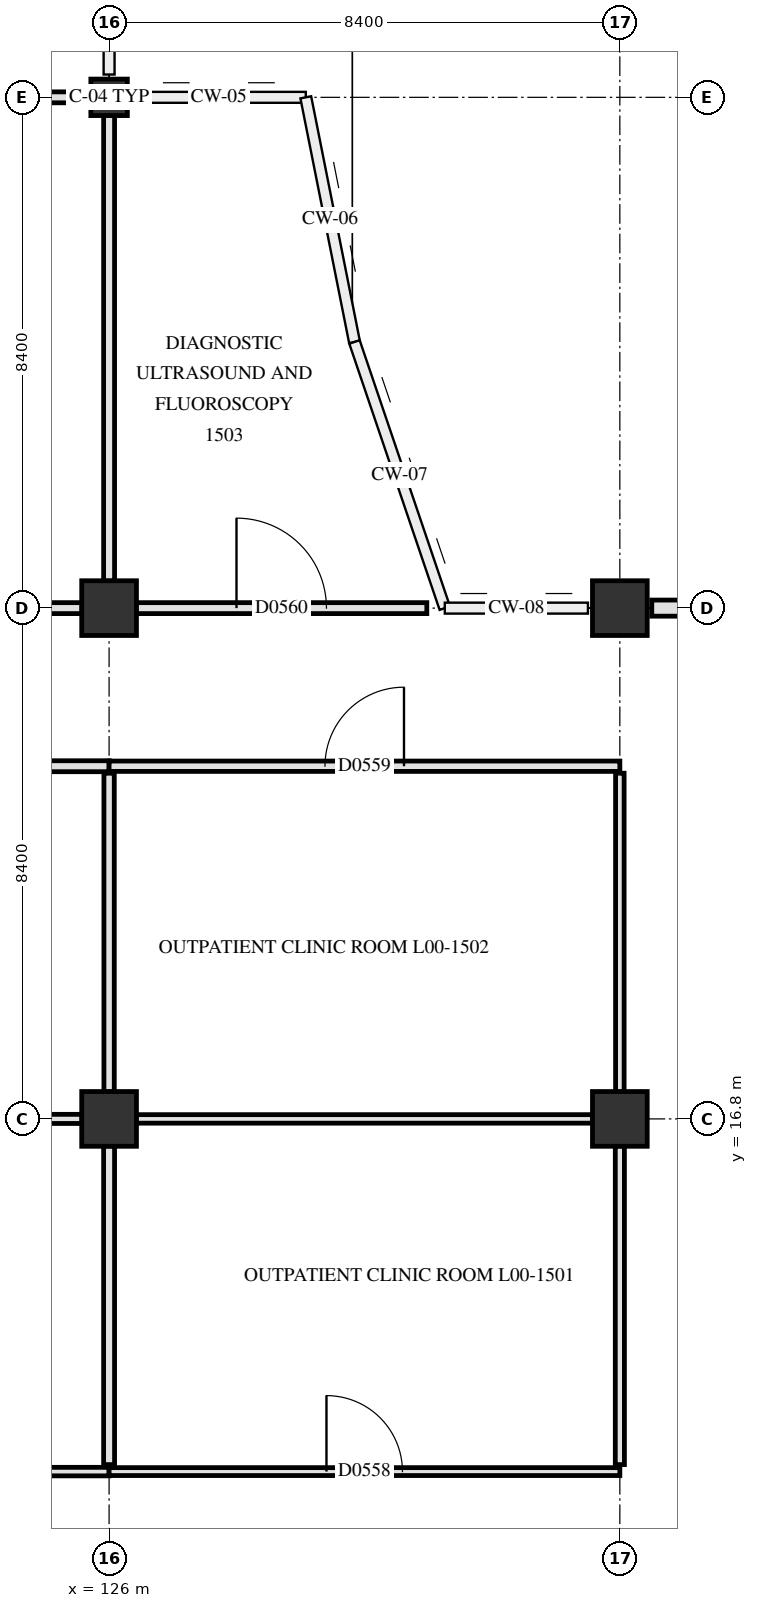
"""IFC4 building model, lengths in metres.
Left out: names, types, materials, properties, quantities, classifications, styles, units other than length and angle.
Written with IfcOpenShell. Run it as: python <this file> out.ifc"""

import sys

from ifc_helpers import new_model, si_unit, direction, frame, frame_2d, origin, origin_2d, place, context, subcontext, project, spatial, rectangle, extrude, element, fill, save


model = new_model("IFC4")
c1 = context("Model", 3, precision=1e-05, world=origin(), true_north=direction((0.0, 1.0)))
c2 = subcontext(c1, "Body", "Model", "MODEL_VIEW")
j1 = project(units=[si_unit("LENGTHUNIT", "METRE"), si_unit("PLANEANGLEUNIT", "RADIAN")], contexts=[c1])
p1 = place(None, origin())
s1 = spatial("IfcSite", under=j1, at=p1, CompositionType="ELEMENT")
p2 = place(p1, origin())
s2 = spatial("IfcBuilding", under=s1, at=p2, CompositionType="ELEMENT")
p3 = place(p2, origin())
s3 = spatial("IfcBuildingStorey", under=s2, at=p3, CompositionType="ELEMENT", Elevation=0.0)
for number, where, z_axis, x_axis in (
    (1, (126.0, 16.8, 0.0), (0.0, 0.0, 1.0), (1.0, 0.0, 0.0)),
    (2, (126.0, 25.2, 0.0), (0.0, 0.0, 1.0), (1.0, 0.0, 0.0)),
):
    element("IfcColumn", number, at=place(p3, frame(where, z_axis=z_axis, x_axis=x_axis)), inside=s3, PredefinedType="COLUMN", context=c2, shape_type="SweptSolid", body=[
        extrude(rectangle(XDim=0.9, YDim=0.9, at=origin_2d()), origin(), (0.0, 0.0, 1.0), 4.8),
    ])
p4 = place(p3, frame((126.0, 33.6, 0.0), z_axis=(0.0, 0.0, 1.0), x_axis=(1.0, 0.0, 0.0)))
e3 = element("IfcColumn", 3, at=p4, inside=s3, PredefinedType="COLUMN", context=c2, shape_type="SweptSolid", body=[
    extrude(rectangle(XDim=0.6, YDim=0.6, at=origin_2d()), origin(), (0.0, 0.0, 1.0), 4.8),
])
for number, where, z_axis, x_axis in (
    (4, (134.4, 16.8, 0.0), (0.0, 0.0, 1.0), (1.0, 0.0, 0.0)),
    (5, (134.4, 25.2, 0.0), (0.0, 0.0, 1.0), (1.0, 0.0, 0.0)),
):
    element("IfcColumn", number, at=place(p3, frame(where, z_axis=z_axis, x_axis=x_axis)), inside=s3, PredefinedType="COLUMN", context=c2, shape_type="SweptSolid", body=[
        extrude(rectangle(XDim=0.9, YDim=0.9, at=origin_2d()), origin(), (0.0, 0.0, 1.0), 4.8),
    ])
p5 = place(p3, frame((134.925, 25.2, 0.0), z_axis=(0.0, 0.0, 1.0), x_axis=(1.0, 0.0, 0.0)))
e6 = element("IfcWall", 6, at=p5, inside=s3, PredefinedType="SOLIDWALL", context=c2, shape_type="SweptSolid", body=[
    extrude(rectangle(XDim=5.572, YDim=0.265, at=frame_2d((2.786, 0.0))), origin(), (0.0, 0.0, 1.0), 3.79),
])
p6 = place(p5, frame((2.086, 0.0, 0.85)))
e7 = element("IfcOpeningElement", 7, at=p6, cuts=e6, PredefinedType="OPENING", context=c2, shape_type="SweptSolid", body=[
    extrude(rectangle(XDim=1.4, YDim=1.42, at=frame_2d((0.7, 0.71))), frame((0.0, 0.142, 0.0), z_axis=(0.0, -1.0, 0.0), x_axis=(1.0, 0.0, 0.0)), (0.0, 0.0, 1.0), 0.285),
])
p7 = place(p3, frame((117.6, 11.0, 0.0), z_axis=(0.0, 0.0, 1.0), x_axis=(1.0, 0.0, 0.0)))
e8 = element("IfcWall", 8, at=p7, inside=s3, PredefinedType="PARTITIONING", context=c2, shape_type="SweptSolid", body=[
    extrude(rectangle(XDim=8.4, YDim=0.14, at=frame_2d((4.2, 0.0))), origin(), (0.0, 0.0, 1.0), 3.89),
])
p8 = place(p7, frame((3.5, 0.0, 0.0)))
e9 = element("IfcOpeningElement", 9, at=p8, cuts=e8, PredefinedType="OPENING", context=c2, shape_type="SweptSolid", body=[
    extrude(rectangle(XDim=1.4, YDim=2.2, at=frame_2d((0.7, 1.1))), frame((0.0, 0.08, 0.0), z_axis=(0.0, -1.0, 0.0), x_axis=(1.0, 0.0, 0.0)), (0.0, 0.0, 1.0), 0.16),
])
p9 = place(p3, frame((126.0, 11.0, 0.0), z_axis=(0.0, 0.0, 1.0), x_axis=(1.0, 0.0, 0.0)))
e10 = element("IfcWall", 10, at=p9, inside=s3, PredefinedType="PARTITIONING", context=c2, shape_type="SweptSolid", body=[
    extrude(rectangle(XDim=8.4, YDim=0.13, at=frame_2d((4.2, 0.0))), origin(), (0.0, 0.0, 1.0), 3.89),
])
p10 = place(p9, frame((3.575, 0.0, 0.0)))
e11 = element("IfcOpeningElement", 11, at=p10, cuts=e10, PredefinedType="OPENING", context=c2, shape_type="SweptSolid", body=[
    extrude(rectangle(XDim=1.25, YDim=2.2, at=frame_2d((0.625, 1.1))), frame((0.0, 0.075, 0.0), z_axis=(0.0, -1.0, 0.0), x_axis=(1.0, 0.0, 0.0)), (0.0, 0.0, 1.0), 0.15),
])
p11 = place(p3, frame((118.045, 16.8, 0.0), z_axis=(0.0, 0.0, 1.0), x_axis=(1.0, 0.0, 0.0)))
e12 = element("IfcWall", 12, at=p11, inside=s3, PredefinedType="PARTITIONING", context=c2, shape_type="SweptSolid", body=[
    extrude(rectangle(XDim=7.51, YDim=0.15, at=frame_2d((3.755, 0.0))), origin(), (0.0, 0.0, 1.0), 3.84),
])
p12 = place(p3, frame((126.445, 16.8, 0.0), z_axis=(0.0, 0.0, 1.0), x_axis=(1.0, 0.0, 0.0)))
e13 = element("IfcWall", 13, at=p12, inside=s3, PredefinedType="PARTITIONING", context=c2, shape_type="SweptSolid", body=[
    extrude(rectangle(XDim=7.51, YDim=0.14, at=frame_2d((3.755, 0.0))), origin(), (0.0, 0.0, 1.0), 3.84),
])
p13 = place(p3, frame((117.6, 22.6, 0.0), z_axis=(0.0, 0.0, 1.0), x_axis=(1.0, 0.0, 0.0)))
e14 = element("IfcWall", 14, at=p13, inside=s3, PredefinedType="PARTITIONING", context=c2, shape_type="SweptSolid", body=[
    extrude(rectangle(XDim=8.4, YDim=0.18, at=frame_2d((4.2, 0.0))), origin(), (0.0, 0.0, 1.0), 3.89),
])
p14 = place(p13, frame((3.525, 0.0, 0.0)))
e15 = element("IfcOpeningElement", 15, at=p14, cuts=e14, PredefinedType="OPENING", context=c2, shape_type="SweptSolid", body=[
    extrude(rectangle(XDim=1.35, YDim=2.2, at=frame_2d((0.675, 1.1))), frame((0.0, 0.1, 0.0), z_axis=(0.0, -1.0, 0.0), x_axis=(1.0, 0.0, 0.0)), (0.0, 0.0, 1.0), 0.2),
])
p15 = place(p3, frame((126.0, 22.6, 0.0), z_axis=(0.0, 0.0, 1.0), x_axis=(1.0, 0.0, 0.0)))
e16 = element("IfcWall", 16, at=p15, inside=s3, PredefinedType="PARTITIONING", context=c2, shape_type="SweptSolid", body=[
    extrude(rectangle(XDim=8.4, YDim=0.17, at=frame_2d((4.2, 0.0))), origin(), (0.0, 0.0, 1.0), 3.89),
])
p16 = place(p15, frame((3.55, 0.0, 0.0)))
e17 = element("IfcOpeningElement", 17, at=p16, cuts=e16, PredefinedType="OPENING", context=c2, shape_type="SweptSolid", body=[
    extrude(rectangle(XDim=1.3, YDim=2.2, at=frame_2d((0.65, 1.1))), frame((0.0, 0.095, 0.0), z_axis=(0.0, -1.0, 0.0), x_axis=(1.0, 0.0, 0.0)), (0.0, 0.0, 1.0), 0.19),
])
p17 = place(p3, frame((118.045, 25.2, 0.0), z_axis=(0.0, 0.0, 1.0), x_axis=(1.0, 0.0, 0.0)))
e18 = element("IfcWall", 18, at=p17, inside=s3, PredefinedType="PARTITIONING", context=c2, shape_type="SweptSolid", body=[
    extrude(rectangle(XDim=7.51, YDim=0.18, at=frame_2d((3.755, 0.0))), origin(), (0.0, 0.0, 1.0), 3.84),
])
p18 = place(p17, frame((3.03, 0.0, 0.0)))
e19 = element("IfcOpeningElement", 19, at=p18, cuts=e18, PredefinedType="OPENING", context=c2, shape_type="SweptSolid", body=[
    extrude(rectangle(XDim=1.45, YDim=2.2, at=frame_2d((0.725, 1.1))), frame((0.0, 0.1, 0.0), z_axis=(0.0, -1.0, 0.0), x_axis=(1.0, 0.0, 0.0)), (0.0, 0.0, 1.0), 0.2),
])
p19 = place(p3, frame((126.445, 25.2, 0.0), z_axis=(0.0, 0.0, 1.0), x_axis=(1.0, 0.0, 0.0)))
e20 = element("IfcWall", 20, at=p19, inside=s3, PredefinedType="PARTITIONING", context=c2, shape_type="SweptSolid", body=[
    extrude(rectangle(XDim=4.78, YDim=0.18, at=frame_2d((2.39, 0.0))), origin(), (0.0, 0.0, 1.0), 3.84),
])
p20 = place(p19, frame((1.65, 0.0, 0.0)))
e21 = element("IfcOpeningElement", 21, at=p20, cuts=e20, PredefinedType="OPENING", context=c2, shape_type="SweptSolid", body=[
    extrude(rectangle(XDim=1.48, YDim=2.22, at=frame_2d((0.74, 1.11))), frame((0.0, 0.1, 0.0), z_axis=(0.0, -1.0, 0.0), x_axis=(1.0, 0.0, 0.0)), (0.0, 0.0, 1.0), 0.2),
])
p21 = place(p3, frame((118.045, 33.6, 0.0), z_axis=(0.0, 0.0, 1.0), x_axis=(1.0, 0.0, 0.0)))
e22 = element("IfcWall", 22, at=p21, inside=s3, PredefinedType="PARTITIONING", context=c2, shape_type="SweptSolid", body=[
    extrude(rectangle(XDim=7.66, YDim=0.18, at=frame_2d((3.83, 0.0))), origin(), (0.0, 0.0, 1.0), 3.84),
])
p22 = place(p3, frame((126.0, 11.115, 0.0), z_axis=(0.0, 0.0, 1.0), x_axis=(0.0, 1.0, 0.0)))
e23 = element("IfcWall", 23, at=p22, inside=s3, PredefinedType="PARTITIONING", context=c2, shape_type="SweptSolid", body=[
    extrude(rectangle(XDim=5.24, YDim=0.18, at=frame_2d((2.62, 0.0))), origin(), (0.0, 0.0, 1.0), 3.89),
])
p23 = place(p3, frame((126.0, 17.245, 0.0), z_axis=(0.0, 0.0, 1.0), x_axis=(0.0, 1.0, 0.0)))
e24 = element("IfcWall", 24, at=p23, inside=s3, PredefinedType="PARTITIONING", context=c2, shape_type="SweptSolid", body=[
    extrude(rectangle(XDim=5.24, YDim=0.17, at=frame_2d((2.62, 0.0))), origin(), (0.0, 0.0, 1.0), 3.89),
])
p24 = place(p3, frame((126.0, 25.645, 0.0), z_axis=(0.0, 0.0, 1.0), x_axis=(0.0, 1.0, 0.0)))
e25 = element("IfcWall", 25, at=p24, inside=s3, PredefinedType="PARTITIONING", context=c2, shape_type="SweptSolid", body=[
    extrude(rectangle(XDim=7.66, YDim=0.18, at=frame_2d((3.83, 0.0))), origin(), (0.0, 0.0, 1.0), 3.89),
])
p25 = place(p3, frame((134.4, 11.115, 0.0), z_axis=(0.0, 0.0, 1.0), x_axis=(0.0, 1.0, 0.0)))
e26 = element("IfcWall", 26, at=p25, inside=s3, PredefinedType="PARTITIONING", context=c2, shape_type="SweptSolid", body=[
    extrude(rectangle(XDim=5.24, YDim=0.15, at=frame_2d((2.62, 0.0))), origin(), (0.0, 0.0, 1.0), 3.89),
])
p26 = place(p3, frame((134.4, 17.245, 0.0), z_axis=(0.0, 0.0, 1.0), x_axis=(0.0, 1.0, 0.0)))
e27 = element("IfcWall", 27, at=p26, inside=s3, PredefinedType="PARTITIONING", context=c2, shape_type="SweptSolid", body=[
    extrude(rectangle(XDim=5.24, YDim=0.14, at=frame_2d((2.62, 0.0))), origin(), (0.0, 0.0, 1.0), 3.89),
])
p27 = place(p10, origin())
e28 = element("IfcDoor", 28, at=p27, inside=s3, OperationType="SINGLE_SWING_LEFT", PredefinedType="DOOR", context=c2, shape_type="SweptSolid", body=[
    extrude(rectangle(XDim=1.25, YDim=2.2, at=frame_2d((0.625, 1.1))), frame((0.0, 0.025, 0.0), z_axis=(0.0, -1.0, 0.0), x_axis=(1.0, 0.0, 0.0)), (0.0, 0.0, 1.0), 0.05),
])
fill(e11, e28)
p28 = place(p16, origin())
e29 = element("IfcDoor", 29, at=p28, inside=s3, OperationType="SINGLE_SWING_RIGHT", PredefinedType="DOOR", context=c2, shape_type="SweptSolid", body=[
    extrude(rectangle(XDim=1.3, YDim=2.2, at=frame_2d((0.65, 1.1))), frame((0.0, 0.025, 0.0), z_axis=(0.0, -1.0, 0.0), x_axis=(1.0, 0.0, 0.0)), (0.0, 0.0, 1.0), 0.05),
])
fill(e17, e29)
p29 = place(p20, origin())
e30 = element("IfcDoor", 30, at=p29, inside=s3, OperationType="SINGLE_SWING_LEFT", PredefinedType="DOOR", context=c2, shape_type="SweptSolid", body=[
    extrude(rectangle(XDim=1.48, YDim=2.22, at=frame_2d((0.74, 1.11))), frame((0.0, 0.025, 0.0), z_axis=(0.0, -1.0, 0.0), x_axis=(1.0, 0.0, 0.0)), (0.0, 0.0, 1.0), 0.05),
])
fill(e21, e30)
save(model, sys.argv[1])
